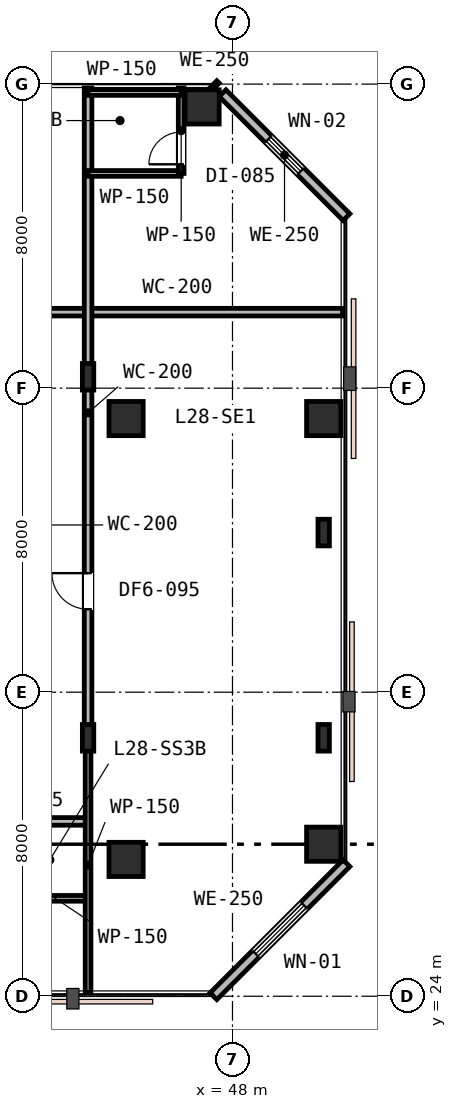
"""IFC4 building model, lengths in metres.
Left out: names, types, materials, properties, quantities, classifications, styles, units other than length and angle.
Written with IfcOpenShell. Run it as: python <this file> out.ifc"""

import sys

from ifc_helpers import new_model, si_unit, direction, frame, frame_2d, origin, origin_2d, place, context, subcontext, project, spatial, rectangle, i_section, extrude, element, fill, save


model = new_model("IFC4")
c1 = context("Model", 3, precision=1e-05, world=origin(), true_north=direction((0.0, 1.0)))
c2 = subcontext(c1, "Body", "Model", "MODEL_VIEW")
j1 = project(units=[si_unit("LENGTHUNIT", "METRE"), si_unit("PLANEANGLEUNIT", "RADIAN")], contexts=[c1])
p1 = place(None, origin())
s1 = spatial("IfcSite", under=j1, at=p1, CompositionType="ELEMENT")
p2 = place(p1, origin())
s2 = spatial("IfcBuilding", under=s1, at=p2, CompositionType="ELEMENT")
p3 = place(p2, frame((0.0, 0.0, 111.6)))
s3 = spatial("IfcBuildingStorey", under=s2, at=p3, CompositionType="ELEMENT", Elevation=111.6)
for number, where, z_axis, x_axis in (
    (1, (45.2, 27.6, 0.0), (0.0, 0.0, 1.0), (1.0, 0.0, 0.0)),
    (2, (45.2, 39.2, 0.0), (0.0, 0.0, 1.0), (1.0, 0.0, 0.0)),
    (3, (47.2, 47.4, 0.0), (0.0, 0.0, 1.0), (1.0, 0.0, 0.0)),
    (4, (50.4, 28.0, 0.0), (0.0, 0.0, 1.0), (1.0, 0.0, 0.0)),
    (5, (50.4, 39.2, 0.0), (0.0, 0.0, 1.0), (1.0, 0.0, 0.0)),
):
    element("IfcColumn", number, at=place(p3, frame(where, z_axis=z_axis, x_axis=x_axis)), inside=s3, PredefinedType="COLUMN", context=c2, shape_type="SweptSolid", body=[
        extrude(rectangle(XDim=0.9, YDim=0.9, at=origin_2d()), origin(), (0.0, 0.0, 1.0), 3.6),
    ])
for number, where, z_axis, x_axis in (
    (6, (44.2, 30.8, 0.0), (0.0, 0.0, 1.0), (1.0, 0.0, 0.0)),
    (7, (44.2, 40.3, 0.0), (0.0, 0.0, 1.0), (1.0, 0.0, 0.0)),
    (8, (50.4, 30.8, 0.0), (0.0, 0.0, 1.0), (1.0, 0.0, 0.0)),
    (9, (50.4, 36.2, 0.0), (0.0, 0.0, 1.0), (1.0, 0.0, 0.0)),
):
    element("IfcColumn", number, at=place(p3, frame(where, z_axis=z_axis, x_axis=x_axis)), inside=s3, PredefinedType="COLUMN", context=c2, shape_type="SweptSolid", body=[
        extrude(i_section(OverallWidth=0.3, OverallDepth=0.7, WebThickness=0.017, FlangeThickness=0.032, FilletRadius=0.027, at=origin_2d()), origin(), (0.0, 0.0, 1.0), 3.6),
    ])
p4 = place(p3, frame((47.5, 24.0, 0.0), z_axis=(0.0, 0.0, 1.0), x_axis=(0.707106781187, 0.707106781187, 0.0)))
e10 = element("IfcWall", 10, at=p4, inside=s3, PredefinedType="STANDARD", context=c2, shape_type="SweptSolid", body=[
    extrude(rectangle(XDim=4.95, YDim=0.25, at=frame_2d((2.475, 0.0))), origin(), (0.0, 0.0, 1.0), 3.33),
])
p5 = place(p4, frame((1.575, 0.0, 0.75)))
e11 = element("IfcOpeningElement", 11, at=p5, cuts=e10, PredefinedType="OPENING", context=c2, shape_type="SweptSolid", body=[
    extrude(rectangle(XDim=1.8, YDim=1.85, at=frame_2d((0.9, 0.925))), frame((0.0, 0.135, 0.0), z_axis=(0.0, -1.0, 0.0), x_axis=(1.0, 0.0, 0.0)), (0.0, 0.0, 1.0), 0.27),
])
p6 = place(p3, frame((51.0, 44.5, 0.0), z_axis=(0.0, 0.0, 1.0), x_axis=(-0.707106781187, 0.707106781187, 0.0)))
e12 = element("IfcWall", 12, at=p6, inside=s3, PredefinedType="STANDARD", context=c2, shape_type="SweptSolid", body=[
    extrude(rectangle(XDim=4.613, YDim=0.25, at=frame_2d((2.306, 0.0))), origin(), (0.0, 0.0, 1.0), 3.33),
])
p7 = place(p6, frame((1.706, 0.0, 0.85)))
e13 = element("IfcOpeningElement", 13, at=p7, cuts=e12, PredefinedType="OPENING", context=c2, shape_type="SweptSolid", body=[
    extrude(rectangle(XDim=1.2, YDim=1.6, at=frame_2d((0.6, 0.8))), frame((0.0, 0.135, 0.0), z_axis=(0.0, -1.0, 0.0), x_axis=(1.0, 0.0, 0.0)), (0.0, 0.0, 1.0), 0.27),
])
p8 = place(p3, frame((47.562, 47.938, 0.0), z_axis=(0.0, 0.0, 1.0), x_axis=(-0.707106781187, 0.707106781187, 0.0)))
e14 = element("IfcWall", 14, at=p8, inside=s3, PredefinedType="STANDARD", context=c2, shape_type="SweptSolid", body=[
    extrude(rectangle(XDim=0.087, YDim=0.25, at=frame_2d((0.044, 0.0))), origin(), (0.0, 0.0, 1.0), 3.33),
])
p9 = place(p3, frame((13.6, 28.6, 0.0), z_axis=(0.0, 0.0, 1.0), x_axis=(1.0, 0.0, 0.0)))
e15 = element("IfcWall", 15, at=p9, inside=s3, PredefinedType="PARTITIONING", context=c2, shape_type="SweptSolid", body=[
    extrude(rectangle(XDim=30.6, YDim=0.2, at=frame_2d((15.3, 0.0))), origin(), (0.0, 0.0, 1.0), 2.87),
])
p10 = place(p9, frame((13.325, 0.0, 0.0)))
e16 = element("IfcOpeningElement", 16, at=p10, cuts=e15, PredefinedType="OPENING", context=c2, shape_type="SweptSolid", body=[
    extrude(rectangle(XDim=0.95, YDim=2.15, at=frame_2d((0.475, 1.075))), frame((0.0, 0.11, 0.0), z_axis=(0.0, -1.0, 0.0), x_axis=(1.0, 0.0, 0.0)), (0.0, 0.0, 1.0), 0.22),
])
p11 = place(p9, frame((18.761, 0.0, 0.0)))
e17 = element("IfcOpeningElement", 17, at=p11, cuts=e15, PredefinedType="OPENING", context=c2, shape_type="SweptSolid", body=[
    extrude(rectangle(XDim=0.95, YDim=2.15, at=frame_2d((0.475, 1.075))), frame((0.0, 0.11, 0.0), z_axis=(0.0, -1.0, 0.0), x_axis=(1.0, 0.0, 0.0)), (0.0, 0.0, 1.0), 0.22),
])
p12 = place(p9, frame((25.503, 0.0, 0.0)))
e18 = element("IfcOpeningElement", 18, at=p12, cuts=e15, PredefinedType="OPENING", context=c2, shape_type="SweptSolid", body=[
    extrude(rectangle(XDim=0.95, YDim=2.15, at=frame_2d((0.475, 1.075))), frame((0.0, 0.11, 0.0), z_axis=(0.0, -1.0, 0.0), x_axis=(1.0, 0.0, 0.0)), (0.0, 0.0, 1.0), 0.22),
])
p13 = place(p3, frame((42.2, 42.0, 0.0), z_axis=(0.0, 0.0, 1.0), x_axis=(1.0, 0.0, 0.0)))
e19 = element("IfcWall", 19, at=p13, inside=s3, PredefinedType="PARTITIONING", context=c2, shape_type="SweptSolid", body=[
    extrude(rectangle(XDim=8.7, YDim=0.2, at=frame_2d((4.35, 0.0))), origin(), (0.0, 0.0, 1.0), 3.33),
])
p14 = place(p3, frame((41.824, 26.576, 0.0), z_axis=(0.0, 0.0, 1.0), x_axis=(1.0, 0.0, 0.0)))
e20 = element("IfcWall", 20, at=p14, inside=s3, PredefinedType="PARTITIONING", context=c2, shape_type="SweptSolid", body=[
    extrude(rectangle(XDim=2.376, YDim=0.15, at=frame_2d((1.188, 0.0))), origin(), (0.0, 0.0, 1.0), 3.33),
])
p15 = place(p3, frame((44.2, 30.8, 0.0), z_axis=(0.0, 0.0, 1.0), x_axis=(0.0, -1.0, 0.0)))
e21 = element("IfcWall", 21, at=p15, inside=s3, PredefinedType="PARTITIONING", context=c2, shape_type="SweptSolid", body=[
    extrude(rectangle(XDim=6.7, YDim=0.15, at=frame_2d((3.35, 0.0))), origin(), (0.0, 0.0, 1.0), 2.87),
])
p16 = place(p3, frame((44.2, 30.8, 0.0), z_axis=(0.0, 0.0, 1.0), x_axis=(0.0, 1.0, 0.0)))
e22 = element("IfcWall", 22, at=p16, inside=s3, PredefinedType="PARTITIONING", context=c2, shape_type="SweptSolid", body=[
    extrude(rectangle(XDim=17.1, YDim=0.2, at=frame_2d((8.55, 0.0))), origin(), (0.0, 0.0, 1.0), 2.87),
])
p17 = place(p16, frame((3.382, 0.0, 0.0)))
e23 = element("IfcOpeningElement", 23, at=p17, cuts=e22, PredefinedType="OPENING", context=c2, shape_type="SweptSolid", body=[
    extrude(rectangle(XDim=0.95, YDim=2.15, at=frame_2d((0.475, 1.075))), frame((0.0, 0.11, 0.0), z_axis=(0.0, -1.0, 0.0), x_axis=(1.0, 0.0, 0.0)), (0.0, 0.0, 1.0), 0.22),
])
p18 = place(p3, frame((44.2, 45.65, 0.0), z_axis=(0.0, 0.0, 1.0), x_axis=(1.0, 0.0, 0.0)))
e24 = element("IfcWall", 24, at=p18, inside=s3, PredefinedType="PARTITIONING", context=c2, shape_type="SweptSolid", body=[
    extrude(rectangle(XDim=2.45, YDim=0.15, at=frame_2d((1.225, 0.0))), origin(), (0.0, 0.0, 1.0), 3.33),
])
p19 = place(p3, frame((46.65, 45.65, 0.0), z_axis=(0.0, 0.0, 1.0), x_axis=(0.0, 1.0, 0.0)))
e25 = element("IfcWall", 25, at=p19, inside=s3, PredefinedType="PARTITIONING", context=c2, shape_type="SweptSolid", body=[
    extrude(rectangle(XDim=2.25, YDim=0.15, at=frame_2d((1.125, 0.0))), origin(), (0.0, 0.0, 1.0), 2.96),
])
p20 = place(p19, frame((0.24, 0.0, 0.0)))
e26 = element("IfcOpeningElement", 26, at=p20, cuts=e25, PredefinedType="OPENING", context=c2, shape_type="SweptSolid", body=[
    extrude(rectangle(XDim=0.85, YDim=2.15, at=frame_2d((0.425, 1.075))), frame((0.0, 0.085, 0.0), z_axis=(0.0, -1.0, 0.0), x_axis=(1.0, 0.0, 0.0)), (0.0, 0.0, 1.0), 0.17),
])
p21 = place(p3, frame((44.2, 47.78, 0.0), z_axis=(0.0, 0.0, 1.0), x_axis=(1.0, 0.0, 0.0)))
e27 = element("IfcWall", 27, at=p21, inside=s3, PredefinedType="PARTITIONING", context=c2, shape_type="SweptSolid", body=[
    extrude(rectangle(XDim=2.45, YDim=0.15, at=frame_2d((1.225, 0.0))), origin(), (0.0, 0.0, 1.0), 2.96),
])
p22 = place(p5, origin())
e28 = element("IfcWindow", 28, at=p22, inside=s3, PartitioningType="SINGLE_PANEL", PredefinedType="WINDOW", context=c2, shape_type="SweptSolid", body=[
    extrude(rectangle(XDim=1.8, YDim=1.85, at=frame_2d((0.9, 0.925))), frame((0.0, 0.03, 0.0), z_axis=(0.0, -1.0, 0.0), x_axis=(1.0, 0.0, 0.0)), (0.0, 0.0, 1.0), 0.06),
])
fill(e11, e28)
p23 = place(p7, origin())
e29 = element("IfcWindow", 29, at=p23, inside=s3, PartitioningType="SINGLE_PANEL", PredefinedType="WINDOW", context=c2, shape_type="SweptSolid", body=[
    extrude(rectangle(XDim=1.2, YDim=1.6, at=frame_2d((0.6, 0.8))), frame((0.0, 0.03, 0.0), z_axis=(0.0, -1.0, 0.0), x_axis=(1.0, 0.0, 0.0)), (0.0, 0.0, 1.0), 0.06),
])
fill(e13, e29)
p24 = place(p17, origin())
e30 = element("IfcDoor", 30, at=p24, inside=s3, OperationType="SINGLE_SWING_RIGHT", PredefinedType="DOOR", context=c2, shape_type="SweptSolid", body=[
    extrude(rectangle(XDim=0.95, YDim=2.15, at=frame_2d((0.475, 1.075))), frame((0.0, 0.025, 0.0), z_axis=(0.0, -1.0, 0.0), x_axis=(1.0, 0.0, 0.0)), (0.0, 0.0, 1.0), 0.05),
])
fill(e23, e30)
p25 = place(p20, origin())
e31 = element("IfcDoor", 31, at=p25, inside=s3, OperationType="SINGLE_SWING_LEFT", PredefinedType="DOOR", context=c2, shape_type="SweptSolid", body=[
    extrude(rectangle(XDim=0.85, YDim=2.15, at=frame_2d((0.425, 1.075))), frame((0.0, 0.025, 0.0), z_axis=(0.0, -1.0, 0.0), x_axis=(1.0, 0.0, 0.0)), (0.0, 0.0, 1.0), 0.05),
])
fill(e26, e31)
save(model, sys.argv[1])
